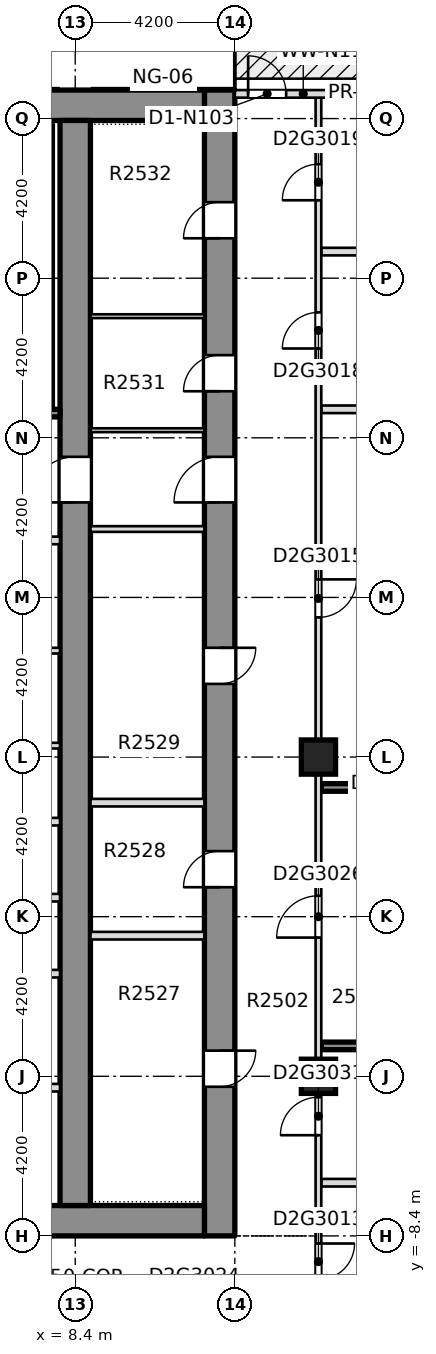
"""IFC4 building model, lengths in metres.
Left out: names, types, materials, properties, quantities, classifications, styles, units other than length and angle.
Written with IfcOpenShell. Run it as: python <this file> out.ifc"""

import sys

from ifc_helpers import new_model, si_unit, direction, frame, frame_2d, origin, origin_2d, place, context, subcontext, project, spatial, rectangle, extrude, element, fill, save


model = new_model("IFC4")
c1 = context("Model", 3, precision=1e-05, world=origin(), true_north=direction((0.0, 1.0)))
c2 = subcontext(c1, "Body", "Model", "MODEL_VIEW")
j1 = project(units=[si_unit("LENGTHUNIT", "METRE"), si_unit("PLANEANGLEUNIT", "RADIAN")], contexts=[c1])
p1 = place(None, origin())
s1 = spatial("IfcSite", under=j1, at=p1, CompositionType="ELEMENT")
p2 = place(p1, origin())
s2 = spatial("IfcBuilding", under=s1, at=p2, CompositionType="ELEMENT")
p3 = place(p2, frame((0.0, 0.0, 101.1)))
s3 = spatial("IfcBuildingStorey", under=s2, at=p3, CompositionType="ELEMENT", Elevation=101.1)
p4 = place(p3, frame((12.2, -8.4, -0.32), z_axis=(0.0, 0.0, 1.0), x_axis=(0.0, 1.0, 0.0)))
e1 = element("IfcWall", 1, at=p4, inside=s3, PredefinedType="SHEAR", context=c2, shape_type="SweptSolid", body=[
    extrude(rectangle(XDim=30.15, YDim=0.8, at=frame_2d((15.075, 0.0))), origin(), (0.0, 0.0, 1.0), 3.45),
])
p5 = place(p4, frame((3.925, 0.0, 0.32)))
e2 = element("IfcOpeningElement", 2, at=p5, cuts=e1, PredefinedType="OPENING", context=c2, shape_type="SweptSolid", body=[
    extrude(rectangle(XDim=0.95, YDim=2.1, at=frame_2d((0.475, 1.05))), frame((0.0, 0.41, 0.0), z_axis=(0.0, -1.0, 0.0), x_axis=(1.0, 0.0, 0.0)), (0.0, 0.0, 1.0), 0.82),
])
p6 = place(p4, frame((9.175, 0.0, 0.32)))
e3 = element("IfcOpeningElement", 3, at=p6, cuts=e1, PredefinedType="OPENING", context=c2, shape_type="SweptSolid", body=[
    extrude(rectangle(XDim=0.95, YDim=2.1, at=frame_2d((0.475, 1.05))), frame((0.0, 0.41, 0.0), z_axis=(0.0, -1.0, 0.0), x_axis=(1.0, 0.0, 0.0)), (0.0, 0.0, 1.0), 0.82),
])
p7 = place(p4, frame((14.525, 0.0, 0.32)))
e4 = element("IfcOpeningElement", 4, at=p7, cuts=e1, PredefinedType="OPENING", context=c2, shape_type="SweptSolid", body=[
    extrude(rectangle(XDim=0.95, YDim=2.1, at=frame_2d((0.475, 1.05))), frame((0.0, 0.41, 0.0), z_axis=(0.0, -1.0, 0.0), x_axis=(1.0, 0.0, 0.0)), (0.0, 0.0, 1.0), 0.82),
])
p8 = place(p4, frame((22.225, 0.0, 0.32)))
e5 = element("IfcOpeningElement", 5, at=p8, cuts=e1, PredefinedType="OPENING", context=c2, shape_type="SweptSolid", body=[
    extrude(rectangle(XDim=0.95, YDim=2.1, at=frame_2d((0.475, 1.05))), frame((0.0, 0.41, 0.0), z_axis=(0.0, -1.0, 0.0), x_axis=(1.0, 0.0, 0.0)), (0.0, 0.0, 1.0), 0.82),
])
p9 = place(p4, frame((26.25, 0.0, 0.32)))
e6 = element("IfcOpeningElement", 6, at=p9, cuts=e1, PredefinedType="OPENING", context=c2, shape_type="SweptSolid", body=[
    extrude(rectangle(XDim=0.95, YDim=2.1, at=frame_2d((0.475, 1.05))), frame((0.0, 0.41, 0.0), z_axis=(0.0, -1.0, 0.0), x_axis=(1.0, 0.0, 0.0)), (0.0, 0.0, 1.0), 0.82),
])
p10 = place(p4, frame((19.3, 0.0, 0.32)))
e7 = element("IfcOpeningElement", 7, at=p10, cuts=e1, PredefinedType="OPENING", context=c2, shape_type="SweptSolid", body=[
    extrude(rectangle(XDim=1.2, YDim=2.1, at=frame_2d((0.6, 1.05))), frame((0.0, 0.41, 0.0), z_axis=(0.0, -1.0, 0.0), x_axis=(1.0, 0.0, 0.0)), (0.0, 0.0, 1.0), 0.82),
])
p11 = place(p3, frame((-11.8, -8.0, -0.32), z_axis=(0.0, 0.0, 1.0), x_axis=(1.0, 0.0, 0.0)))
e8 = element("IfcWall", 8, at=p11, inside=s3, PredefinedType="SHEAR", context=c2, shape_type="SweptSolid", body=[
    extrude(rectangle(XDim=23.6, YDim=0.8, at=frame_2d((11.8, 0.0))), origin(), (0.0, 0.0, 1.0), 3.45),
])
p12 = place(p11, frame((7.05, 0.0, 0.32)))
e9 = element("IfcOpeningElement", 9, at=p12, cuts=e8, PredefinedType="OPENING", context=c2, shape_type="SweptSolid", body=[
    extrude(rectangle(XDim=1.8, YDim=2.1, at=frame_2d((0.9, 1.05))), frame((0.0, 0.41, 0.0), z_axis=(0.0, -1.0, 0.0), x_axis=(1.0, 0.0, 0.0)), (0.0, 0.0, 1.0), 0.82),
])
p13 = place(p11, frame((14.75, 0.0, 0.32)))
e10 = element("IfcOpeningElement", 10, at=p13, cuts=e8, PredefinedType="OPENING", context=c2, shape_type="SweptSolid", body=[
    extrude(rectangle(XDim=1.8, YDim=2.1, at=frame_2d((0.9, 1.05))), frame((0.0, 0.41, 0.0), z_axis=(0.0, -1.0, 0.0), x_axis=(1.0, 0.0, 0.0)), (0.0, 0.0, 1.0), 0.82),
])
p14 = place(p3, frame((-11.8, 21.35, -0.32), z_axis=(0.0, 0.0, 1.0), x_axis=(1.0, 0.0, 0.0)))
e11 = element("IfcWall", 11, at=p14, inside=s3, PredefinedType="SHEAR", context=c2, shape_type="SweptSolid", body=[
    extrude(rectangle(XDim=23.6, YDim=0.8, at=frame_2d((11.8, 0.0))), origin(), (0.0, 0.0, 1.0), 3.45),
])
p15 = place(p3, frame((8.4, -7.6, -0.32), z_axis=(0.0, 0.0, 1.0), x_axis=(0.0, 1.0, 0.0)))
e12 = element("IfcWall", 12, at=p15, inside=s3, PredefinedType="SHEAR", context=c2, shape_type="SweptSolid", body=[
    extrude(rectangle(XDim=28.55, YDim=0.8, at=frame_2d((14.275, 0.0))), origin(), (0.0, 0.0, 1.0), 3.45),
])
p16 = place(p15, frame((18.5, 0.0, 0.32)))
e13 = element("IfcOpeningElement", 13, at=p16, cuts=e12, PredefinedType="OPENING", context=c2, shape_type="SweptSolid", body=[
    extrude(rectangle(XDim=1.2, YDim=2.1, at=frame_2d((0.6, 1.05))), frame((0.0, 0.41, 0.0), z_axis=(0.0, -1.0, 0.0), x_axis=(1.0, 0.0, 0.0)), (0.0, 0.0, 1.0), 0.82),
])
for number, where, z_axis, x_axis in (
    (14, (14.8, -4.2, -0.32), (0.0, 0.0, 1.0), (1.0, 0.0, 0.0)),
    (15, (14.8, 4.2, -0.32), (0.0, 0.0, 1.0), (1.0, 0.0, 0.0)),
):
    element("IfcColumn", number, at=place(p3, frame(where, z_axis=z_axis, x_axis=x_axis)), inside=s3, PredefinedType="COLUMN", context=c2, shape_type="SweptSolid", body=[
        extrude(rectangle(XDim=0.9, YDim=0.9, at=origin_2d()), origin(), (0.0, 0.0, 1.0), 3.45),
    ])
p17 = place(p3, frame((14.875, -7.0, 0.0), z_axis=(0.0, 0.0, 1.0), x_axis=(1.0, 0.0, 0.0)))
e16 = element("IfcWall", 16, at=p17, inside=s3, PredefinedType="PARTITIONING", context=c2, shape_type="SweptSolid", body=[
    extrude(rectangle(XDim=10.875, YDim=0.2, at=frame_2d((5.438, 0.0))), origin(), (0.0, 0.0, 1.0), 3.13),
])
p18 = place(p3, frame((14.875, -3.4, 0.0), z_axis=(0.0, 0.0, 1.0), x_axis=(1.0, 0.0, 0.0)))
e17 = element("IfcWall", 17, at=p18, inside=s3, PredefinedType="SOLIDWALL", context=c2, shape_type="SweptSolid", body=[
    extrude(rectangle(XDim=5.525, YDim=0.2, at=frame_2d((2.762, 0.0))), origin(), (0.0, 0.0, 1.0), 3.13),
])
p19 = place(p3, frame((14.875, 3.4, 0.0), z_axis=(0.0, 0.0, 1.0), x_axis=(1.0, 0.0, 0.0)))
e18 = element("IfcWall", 18, at=p19, inside=s3, PredefinedType="SOLIDWALL", context=c2, shape_type="SweptSolid", body=[
    extrude(rectangle(XDim=5.575, YDim=0.2, at=frame_2d((2.788, 0.0))), origin(), (0.0, 0.0, 1.0), 3.13),
])
for number, where, z_axis, x_axis in (
    (19, (14.875, 13.35, 0.0), (0.0, 0.0, 1.0), (1.0, 0.0, 0.0)),
    (20, (14.875, 17.5, 0.0), (0.0, 0.0, 1.0), (1.0, 0.0, 0.0)),
):
    element("IfcWall", number, at=place(p3, frame(where, z_axis=z_axis, x_axis=x_axis)), inside=s3, PredefinedType="PARTITIONING", context=c2, shape_type="SweptSolid", body=[
        extrude(rectangle(XDim=2.475, YDim=0.2, at=frame_2d((1.238, 0.0))), origin(), (0.0, 0.0, 1.0), 3.13),
    ])
p20 = place(p3, frame((14.8, -10.6, 0.0), z_axis=(0.0, 0.0, 1.0), x_axis=(0.0, 1.0, 0.0)))
e21 = element("IfcWall", 21, at=p20, inside=s3, PredefinedType="PARTITIONING", context=c2, shape_type="SweptSolid", body=[
    extrude(rectangle(XDim=32.15, YDim=0.15, at=frame_2d((16.075, 0.0))), origin(), (0.0, 0.0, 1.0), 3.13),
])
p21 = place(p20, frame((1.05, 0.0, 0.0)))
e22 = element("IfcOpeningElement", 22, at=p21, cuts=e21, PredefinedType="OPENING", context=c2, shape_type="SweptSolid", body=[
    extrude(rectangle(XDim=0.95, YDim=2.1, at=frame_2d((0.475, 1.05))), frame((0.0, 0.085, 0.0), z_axis=(0.0, -1.0, 0.0), x_axis=(1.0, 0.0, 0.0)), (0.0, 0.0, 1.0), 0.17),
])
p22 = place(p20, frame((18.475, 0.0, 0.0)))
e23 = element("IfcOpeningElement", 23, at=p22, cuts=e21, PredefinedType="OPENING", context=c2, shape_type="SweptSolid", body=[
    extrude(rectangle(XDim=1.0, YDim=2.1, at=frame_2d((0.5, 1.05))), frame((0.0, 0.085, 0.0), z_axis=(0.0, -1.0, 0.0), x_axis=(1.0, 0.0, 0.0)), (0.0, 0.0, 1.0), 0.17),
])
p23 = place(p20, frame((25.55, 0.0, 0.0)))
e24 = element("IfcOpeningElement", 24, at=p23, cuts=e21, PredefinedType="OPENING", context=c2, shape_type="SweptSolid", body=[
    extrude(rectangle(XDim=0.95, YDim=2.1, at=frame_2d((0.475, 1.05))), frame((0.0, 0.085, 0.0), z_axis=(0.0, -1.0, 0.0), x_axis=(1.0, 0.0, 0.0)), (0.0, 0.0, 1.0), 0.17),
])
p24 = place(p20, frame((29.45, 0.0, 0.0)))
e25 = element("IfcOpeningElement", 25, at=p24, cuts=e21, PredefinedType="OPENING", context=c2, shape_type="SweptSolid", body=[
    extrude(rectangle(XDim=0.95, YDim=2.1, at=frame_2d((0.475, 1.05))), frame((0.0, 0.085, 0.0), z_axis=(0.0, -1.0, 0.0), x_axis=(1.0, 0.0, 0.0)), (0.0, 0.0, 1.0), 0.17),
])
p25 = place(p20, frame((10.05, 0.0, 0.0)))
e26 = element("IfcOpeningElement", 26, at=p25, cuts=e21, PredefinedType="OPENING", context=c2, shape_type="SweptSolid", body=[
    extrude(rectangle(XDim=1.1, YDim=2.1, at=frame_2d((0.55, 1.05))), frame((0.0, 0.085, 0.0), z_axis=(0.0, -1.0, 0.0), x_axis=(1.0, 0.0, 0.0)), (0.0, 0.0, 1.0), 0.17),
])
p26 = place(p20, frame((4.85, 0.0, 0.0)))
e27 = element("IfcOpeningElement", 27, at=p26, cuts=e21, PredefinedType="OPENING", context=c2, shape_type="SweptSolid", body=[
    extrude(rectangle(XDim=1.0, YDim=2.1, at=frame_2d((0.5, 1.05))), frame((0.0, 0.085, 0.0), z_axis=(0.0, -1.0, 0.0), x_axis=(1.0, 0.0, 0.0)), (0.0, 0.0, 1.0), 0.17),
])
p27 = place(p3, frame((16.2, 21.65, 0.0), z_axis=(0.0, 0.0, 1.0), x_axis=(-1.0, 0.0, 0.0)))
e28 = element("IfcWall", 28, at=p27, inside=s3, PredefinedType="STANDARD", context=c2, shape_type="SweptSolid", body=[
    extrude(rectangle(XDim=3.6, YDim=0.2, at=frame_2d((1.8, 0.0))), origin(), (0.0, 0.0, 1.0), 3.13),
])
p28 = place(p27, frame((2.25, 0.0, 0.0)))
e29 = element("IfcOpeningElement", 29, at=p28, cuts=e28, PredefinedType="OPENING", context=c2, shape_type="SweptSolid", body=[
    extrude(rectangle(XDim=1.0, YDim=2.4, at=frame_2d((0.5, 1.2))), frame((0.0, 0.11, 0.0), z_axis=(0.0, -1.0, 0.0), x_axis=(1.0, 0.0, 0.0)), (0.0, 0.0, 1.0), 0.22),
])
for number, where, z_axis, x_axis in (
    (30, (5.575, -4.5, 0.0), (0.0, 0.0, 1.0), (1.0, 0.0, 0.0)),
    (31, (5.575, -1.5, 0.0), (0.0, 0.0, 1.0), (1.0, 0.0, 0.0)),
    (32, (5.575, 0.5, 0.0), (0.0, 0.0, 1.0), (1.0, 0.0, 0.0)),
    (33, (5.575, 2.5, 0.0), (0.0, 0.0, 1.0), (1.0, 0.0, 0.0)),
):
    element("IfcWall", number, at=place(p3, frame(where, z_axis=z_axis, x_axis=x_axis)), inside=s3, PredefinedType="PARTITIONING", context=c2, shape_type="SweptSolid", body=[
        extrude(rectangle(XDim=2.424, YDim=0.2, at=frame_2d((1.212, 0.0))), origin(), (0.0, 0.0, 1.0), 3.13),
    ])
p29 = place(p3, frame((5.425, 4.5, 0.0), z_axis=(0.0, 0.0, 1.0), x_axis=(1.0, 0.0, 0.0)))
e34 = element("IfcWall", 34, at=p29, inside=s3, PredefinedType="PARTITIONING", context=c2, shape_type="SweptSolid", body=[
    extrude(rectangle(XDim=2.574, YDim=0.15, at=frame_2d((1.287, 0.0))), origin(), (0.0, 0.0, 1.0), 3.13),
])
p30 = place(p3, frame((-7.999, 7.0, 0.0), z_axis=(0.0, 0.0, 1.0), x_axis=(1.0, 0.0, 0.0)))
e35 = element("IfcWall", 35, at=p30, inside=s3, PredefinedType="PARTITIONING", context=c2, shape_type="SweptSolid", body=[
    extrude(rectangle(XDim=15.998, YDim=0.15, at=frame_2d((7.999, 0.0))), origin(), (0.0, 0.0, 1.0), 3.13),
])
p31 = place(p30, frame((7.299, 0.0, 0.0)))
e36 = element("IfcOpeningElement", 36, at=p31, cuts=e35, PredefinedType="OPENING", context=c2, shape_type="SweptSolid", body=[
    extrude(rectangle(XDim=1.4, YDim=2.1, at=frame_2d((0.7, 1.05))), frame((0.0, 0.085, 0.0), z_axis=(0.0, -1.0, 0.0), x_axis=(1.0, 0.0, 0.0)), (0.0, 0.0, 1.0), 0.17),
])
p32 = place(p3, frame((3.6, 9.9, 0.0), z_axis=(0.0, 0.0, 1.0), x_axis=(1.0, 0.0, 0.0)))
e37 = element("IfcWall", 37, at=p32, inside=s3, PredefinedType="PARTITIONING", context=c2, shape_type="SweptSolid", body=[
    extrude(rectangle(XDim=4.399, YDim=0.2, at=frame_2d((2.199, 0.0))), origin(), (0.0, 0.0, 1.0), 3.13),
])
p33 = place(p32, frame((2.25, 0.0, 0.0)))
e38 = element("IfcOpeningElement", 38, at=p33, cuts=e37, PredefinedType="OPENING", context=c2, shape_type="SweptSolid", body=[
    extrude(rectangle(XDim=1.1, YDim=2.1, at=frame_2d((0.55, 1.05))), frame((0.0, 0.11, 0.0), z_axis=(0.0, -1.0, 0.0), x_axis=(1.0, 0.0, 0.0)), (0.0, 0.0, 1.0), 0.22),
])
p34 = place(p3, frame((3.425, 13.25, 0.0), z_axis=(0.0, 0.0, 1.0), x_axis=(1.0, 0.0, 0.0)))
e39 = element("IfcWall", 39, at=p34, inside=s3, PredefinedType="SOLIDWALL", context=c2, shape_type="SweptSolid", body=[
    extrude(rectangle(XDim=4.574, YDim=0.2, at=frame_2d((2.287, 0.0))), origin(), (0.0, 0.0, 1.0), 3.13),
])
p35 = place(p34, frame((1.825, 0.0, 0.0)))
e40 = element("IfcOpeningElement", 40, at=p35, cuts=e39, PredefinedType="OPENING", context=c2, shape_type="SweptSolid", body=[
    extrude(rectangle(XDim=1.2, YDim=2.1, at=frame_2d((0.6, 1.05))), frame((0.0, 0.11, 0.0), z_axis=(0.0, -1.0, 0.0), x_axis=(1.0, 0.0, 0.0)), (0.0, 0.0, 1.0), 0.22),
])
for number, where, z_axis, x_axis in (
    (41, (8.801, -0.5, 0.0), (0.0, 0.0, 1.0), (1.0, 0.0, 0.0)),
    (42, (8.801, 3.0, 0.0), (0.0, 0.0, 1.0), (1.0, 0.0, 0.0)),
):
    element("IfcWall", number, at=place(p3, frame(where, z_axis=z_axis, x_axis=x_axis)), inside=s3, PredefinedType="PARTITIONING", context=c2, shape_type="SweptSolid", body=[
        extrude(rectangle(XDim=2.998, YDim=0.2, at=frame_2d((1.499, 0.0))), origin(), (0.0, 0.0, 1.0), 3.13),
    ])
p36 = place(p3, frame((8.801, 10.2, 0.0), z_axis=(0.0, 0.0, 1.0), x_axis=(1.0, 0.0, 0.0)))
e43 = element("IfcWall", 43, at=p36, inside=s3, PredefinedType="PARTITIONING", context=c2, shape_type="SweptSolid", body=[
    extrude(rectangle(XDim=2.998, YDim=0.15, at=frame_2d((1.499, 0.0))), origin(), (0.0, 0.0, 1.0), 3.13),
])
for number, where, z_axis, x_axis in (
    (44, (8.801, 12.8, 0.0), (0.0, 0.0, 1.0), (1.0, 0.0, 0.0)),
    (45, (8.801, 15.8, 0.0), (0.0, 0.0, 1.0), (1.0, 0.0, 0.0)),
):
    element("IfcWall", number, at=place(p3, frame(where, z_axis=z_axis, x_axis=x_axis)), inside=s3, PredefinedType="PARTITIONING", context=c2, shape_type="SweptSolid", body=[
        extrude(rectangle(XDim=2.998, YDim=0.1, at=frame_2d((1.499, 0.0))), origin(), (0.0, 0.0, 1.0), 3.13),
    ])
p37 = place(p21, origin())
e46 = element("IfcDoor", 46, at=p37, inside=s3, OperationType="SINGLE_SWING_RIGHT", PredefinedType="DOOR", context=c2, shape_type="SweptSolid", body=[
    extrude(rectangle(XDim=0.95, YDim=2.1, at=frame_2d((0.475, 1.05))), frame((0.0, 0.025, 0.0), z_axis=(0.0, -1.0, 0.0), x_axis=(1.0, 0.0, 0.0)), (0.0, 0.0, 1.0), 0.05),
])
fill(e22, e46)
p38 = place(p22, origin())
e47 = element("IfcDoor", 47, at=p38, inside=s3, OperationType="SINGLE_SWING_LEFT", PredefinedType="DOOR", context=c2, shape_type="SweptSolid", body=[
    extrude(rectangle(XDim=1.0, YDim=2.1, at=frame_2d((0.5, 1.05))), frame((0.0, 0.025, 0.0), z_axis=(0.0, -1.0, 0.0), x_axis=(1.0, 0.0, 0.0)), (0.0, 0.0, 1.0), 0.05),
])
fill(e23, e47)
p39 = place(p23, origin())
e48 = element("IfcDoor", 48, at=p39, inside=s3, OperationType="SINGLE_SWING_RIGHT", PredefinedType="DOOR", context=c2, shape_type="SweptSolid", body=[
    extrude(rectangle(XDim=0.95, YDim=2.1, at=frame_2d((0.475, 1.05))), frame((0.0, 0.025, 0.0), z_axis=(0.0, -1.0, 0.0), x_axis=(1.0, 0.0, 0.0)), (0.0, 0.0, 1.0), 0.05),
])
fill(e24, e48)
p40 = place(p24, origin())
e49 = element("IfcDoor", 49, at=p40, inside=s3, OperationType="SINGLE_SWING_LEFT", PredefinedType="DOOR", context=c2, shape_type="SweptSolid", body=[
    extrude(rectangle(XDim=0.95, YDim=2.1, at=frame_2d((0.475, 1.05))), frame((0.0, 0.025, 0.0), z_axis=(0.0, -1.0, 0.0), x_axis=(1.0, 0.0, 0.0)), (0.0, 0.0, 1.0), 0.05),
])
fill(e25, e49)
p41 = place(p25, origin())
e50 = element("IfcDoor", 50, at=p41, inside=s3, OperationType="SINGLE_SWING_LEFT", PredefinedType="DOOR", context=c2, shape_type="SweptSolid", body=[
    extrude(rectangle(XDim=1.1, YDim=2.1, at=frame_2d((0.55, 1.05))), frame((0.0, 0.025, 0.0), z_axis=(0.0, -1.0, 0.0), x_axis=(1.0, 0.0, 0.0)), (0.0, 0.0, 1.0), 0.05),
])
fill(e26, e50)
p42 = place(p26, origin())
e51 = element("IfcDoor", 51, at=p42, inside=s3, OperationType="SINGLE_SWING_LEFT", PredefinedType="DOOR", context=c2, shape_type="SweptSolid", body=[
    extrude(rectangle(XDim=1.0, YDim=2.1, at=frame_2d((0.5, 1.05))), frame((0.0, 0.025, 0.0), z_axis=(0.0, -1.0, 0.0), x_axis=(1.0, 0.0, 0.0)), (0.0, 0.0, 1.0), 0.05),
])
fill(e27, e51)
p43 = place(p28, origin())
e52 = element("IfcDoor", 52, at=p43, inside=s3, OperationType="SINGLE_SWING_LEFT", PredefinedType="DOOR", context=c2, shape_type="SweptSolid", body=[
    extrude(rectangle(XDim=1.0, YDim=2.4, at=frame_2d((0.5, 1.2))), frame((0.0, 0.025, 0.0), z_axis=(0.0, -1.0, 0.0), x_axis=(1.0, 0.0, 0.0)), (0.0, 0.0, 1.0), 0.05),
])
fill(e29, e52)
p44 = place(p5, origin())
e53 = element("IfcDoor", 53, at=p44, inside=s3, OperationType="SINGLE_SWING_LEFT", PredefinedType="DOOR", context=c2, shape_type="SweptSolid", body=[
    extrude(rectangle(XDim=0.95, YDim=2.1, at=frame_2d((0.475, 1.05))), frame((0.0, 0.025, 0.0), z_axis=(0.0, -1.0, 0.0), x_axis=(1.0, 0.0, 0.0)), (0.0, 0.0, 1.0), 0.05),
])
fill(e2, e53)
p45 = place(p6, origin())
e54 = element("IfcDoor", 54, at=p45, inside=s3, OperationType="SINGLE_SWING_LEFT", PredefinedType="DOOR", context=c2, shape_type="SweptSolid", body=[
    extrude(rectangle(XDim=0.95, YDim=2.1, at=frame_2d((0.475, 1.05))), frame((0.0, 0.025, 0.0), z_axis=(0.0, -1.0, 0.0), x_axis=(1.0, 0.0, 0.0)), (0.0, 0.0, 1.0), 0.05),
])
fill(e3, e54)
p46 = place(p7, origin())
e55 = element("IfcDoor", 55, at=p46, inside=s3, OperationType="SINGLE_SWING_LEFT", PredefinedType="DOOR", context=c2, shape_type="SweptSolid", body=[
    extrude(rectangle(XDim=0.95, YDim=2.1, at=frame_2d((0.475, 1.05))), frame((0.0, 0.025, 0.0), z_axis=(0.0, -1.0, 0.0), x_axis=(1.0, 0.0, 0.0)), (0.0, 0.0, 1.0), 0.05),
])
fill(e4, e55)
p47 = place(p8, origin())
e56 = element("IfcDoor", 56, at=p47, inside=s3, OperationType="SINGLE_SWING_LEFT", PredefinedType="DOOR", context=c2, shape_type="SweptSolid", body=[
    extrude(rectangle(XDim=0.95, YDim=2.1, at=frame_2d((0.475, 1.05))), frame((0.0, 0.025, 0.0), z_axis=(0.0, -1.0, 0.0), x_axis=(1.0, 0.0, 0.0)), (0.0, 0.0, 1.0), 0.05),
])
fill(e5, e56)
p48 = place(p9, origin())
e57 = element("IfcDoor", 57, at=p48, inside=s3, OperationType="SINGLE_SWING_LEFT", PredefinedType="DOOR", context=c2, shape_type="SweptSolid", body=[
    extrude(rectangle(XDim=0.95, YDim=2.1, at=frame_2d((0.475, 1.05))), frame((0.0, 0.025, 0.0), z_axis=(0.0, -1.0, 0.0), x_axis=(1.0, 0.0, 0.0)), (0.0, 0.0, 1.0), 0.05),
])
fill(e6, e57)
p49 = place(p10, origin())
e58 = element("IfcDoor", 58, at=p49, inside=s3, OperationType="SINGLE_SWING_LEFT", PredefinedType="DOOR", context=c2, shape_type="SweptSolid", body=[
    extrude(rectangle(XDim=1.2, YDim=2.1, at=frame_2d((0.6, 1.05))), frame((0.0, 0.025, 0.0), z_axis=(0.0, -1.0, 0.0), x_axis=(1.0, 0.0, 0.0)), (0.0, 0.0, 1.0), 0.05),
])
fill(e7, e58)
p50 = place(p16, origin())
e59 = element("IfcDoor", 59, at=p50, inside=s3, OperationType="SINGLE_SWING_LEFT", PredefinedType="DOOR", context=c2, shape_type="SweptSolid", body=[
    extrude(rectangle(XDim=1.2, YDim=2.1, at=frame_2d((0.6, 1.05))), frame((0.0, 0.025, 0.0), z_axis=(0.0, -1.0, 0.0), x_axis=(1.0, 0.0, 0.0)), (0.0, 0.0, 1.0), 0.05),
])
fill(e13, e59)
save(model, sys.argv[1])
